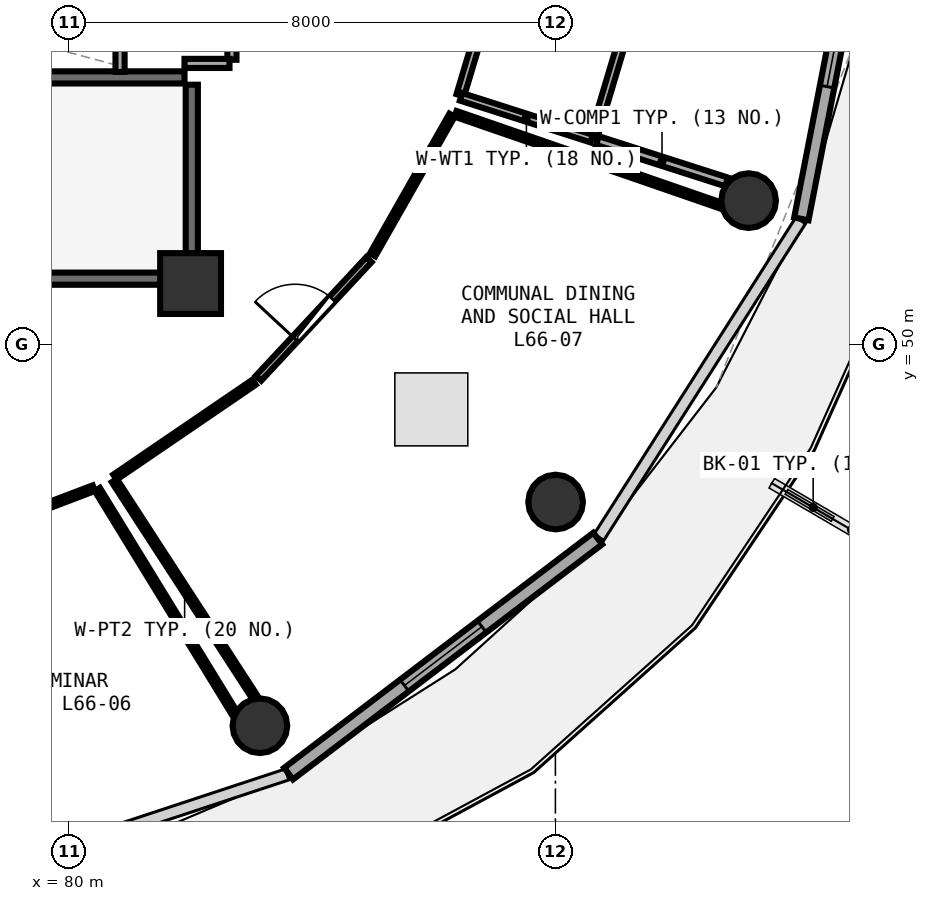
"""IFC4 building model, lengths in metres.
Left out: names, types, materials, properties, quantities, classifications, styles, units other than length and angle.
Written with IfcOpenShell. Run it as: python <this file> out.ifc"""

import sys

from ifc_helpers import new_model, si_unit, direction, frame, frame_2d, origin, origin_2d, place, context, subcontext, project, spatial, rectangle, circle, extrude, element, fill, save


model = new_model("IFC4")
c1 = context("Model", 3, precision=1e-05, world=origin(), true_north=direction((0.0, 1.0)))
c2 = subcontext(c1, "Body", "Model", "MODEL_VIEW")
j1 = project(units=[si_unit("LENGTHUNIT", "METRE"), si_unit("PLANEANGLEUNIT", "RADIAN")], contexts=[c1])
p1 = place(None, origin())
s1 = spatial("IfcSite", under=j1, at=p1, CompositionType="ELEMENT")
p2 = place(p1, origin())
s2 = spatial("IfcBuilding", under=s1, at=p2, CompositionType="ELEMENT")
p3 = place(p2, frame((0.0, 0.0, 259.95)))
s3 = spatial("IfcBuildingStorey", under=s2, at=p3, CompositionType="ELEMENT", Elevation=259.95)
p4 = place(p3, frame((82.0, 51.0, 0.0), z_axis=(0.0, 0.0, 1.0), x_axis=(1.0, 0.0, 0.0)))
e1 = element("IfcColumn", 1, at=p4, inside=s3, PredefinedType="PILASTER", context=c2, shape_type="SweptSolid", body=[
    extrude(rectangle(XDim=1.0, YDim=1.0, at=origin_2d()), origin(), (0.0, 0.0, 1.0), 3.75),
])
for number, where, z_axis, x_axis in (
    (2, (83.14, 43.728, 0.0), (0.0, 0.0, 1.0), (1.0, 0.0, 0.0)),
    (3, (88.003, 47.407, 0.0), (0.0, 0.0, 1.0), (1.0, 0.0, 0.0)),
    (4, (91.177, 52.364, 0.0), (0.0, 0.0, 1.0), (1.0, 0.0, 0.0)),
):
    element("IfcColumn", number, at=place(p3, frame(where, z_axis=z_axis, x_axis=x_axis)), inside=s3, PredefinedType="COLUMN", context=c2, shape_type="SweptSolid", body=[
        extrude(circle(Radius=0.45, at=origin_2d()), origin(), (0.0, 0.0, 1.0), 3.75),
    ])
p5 = place(p3, frame((83.612, 42.94, 0.0), z_axis=(0.0, 0.0, 1.0), x_axis=(0.796010444211, 0.605282886514, 0.0)))
e5 = element("IfcWall", 5, at=p5, inside=s3, PredefinedType="SOLIDWALL", context=c2, shape_type="SweptSolid", body=[
    extrude(rectangle(XDim=6.387, YDim=0.24, at=frame_2d((3.194, 0.0))), origin(), (0.0, 0.0, 1.0), 3.475),
])
p6 = place(p5, frame((2.394, 0.0, 0.85)))
e6 = element("IfcOpeningElement", 6, at=p6, cuts=e5, PredefinedType="OPENING", context=c2, shape_type="SweptSolid", body=[
    extrude(rectangle(XDim=1.6, YDim=1.45, at=frame_2d((0.8, 0.725))), frame((0.0, 0.13, 0.0), z_axis=(0.0, -1.0, 0.0), x_axis=(1.0, 0.0, 0.0)), (0.0, 0.0, 1.0), 0.26),
])
p7 = place(p3, frame((92.045, 52.063, 0.0), z_axis=(0.0, 0.0, 1.0), x_axis=(0.190969309115, 0.981596008028, 0.0)))
e7 = element("IfcWall", 7, at=p7, inside=s3, PredefinedType="SOLIDWALL", context=c2, shape_type="SweptSolid", body=[
    extrude(rectangle(XDim=6.033, YDim=0.24, at=frame_2d((3.017, 0.0))), origin(), (0.0, 0.0, 1.0), 3.475),
])
p8 = place(p7, frame((2.216, 0.0, 0.85)))
e8 = element("IfcOpeningElement", 8, at=p8, cuts=e7, PredefinedType="OPENING", context=c2, shape_type="SweptSolid", body=[
    extrude(rectangle(XDim=1.6, YDim=1.45, at=frame_2d((0.8, 0.725))), frame((0.0, 0.13, 0.0), z_axis=(0.0, -1.0, 0.0), x_axis=(1.0, 0.0, 0.0)), (0.0, 0.0, 1.0), 0.26),
])
p9 = place(p3, frame((74.0, 51.08, 0.0), z_axis=(0.0, 0.0, 1.0), x_axis=(1.0, 0.0, 0.0)))
e9 = element("IfcWall", 9, at=p9, inside=s3, PredefinedType="SHEAR", context=c2, shape_type="SweptSolid", body=[
    extrude(rectangle(XDim=7.9, YDim=0.2, at=frame_2d((3.95, 0.0))), origin(), (0.0, 0.0, 1.0), 3.49),
])
p10 = place(p9, frame((1.12, 0.0, 0.0)))
e10 = element("IfcOpeningElement", 10, at=p10, cuts=e9, PredefinedType="OPENING", context=c2, shape_type="SweptSolid", body=[
    extrude(rectangle(XDim=1.05, YDim=2.1, at=frame_2d((0.525, 1.05))), frame((0.0, 0.11, 0.0), z_axis=(0.0, -1.0, 0.0), x_axis=(1.0, 0.0, 0.0)), (0.0, 0.0, 1.0), 0.22),
])
p11 = place(p3, frame((82.02, 51.2, 0.0), z_axis=(0.0, 0.0, 1.0), x_axis=(0.0, 1.0, 0.0)))
e11 = element("IfcWall", 11, at=p11, inside=s3, PredefinedType="SHEAR", context=c2, shape_type="SweptSolid", body=[
    extrude(rectangle(XDim=3.07, YDim=0.2, at=frame_2d((1.535, 0.0))), origin(), (0.0, 0.0, 1.0), 3.49),
])
p12 = place(p3, frame((81.9, 54.39, 0.0), z_axis=(0.0, 0.0, 1.0), x_axis=(-1.0, 0.0, 0.0)))
e12 = element("IfcWall", 12, at=p12, inside=s3, PredefinedType="SHEAR", context=c2, shape_type="SweptSolid", body=[
    extrude(rectangle(XDim=8.46, YDim=0.2, at=frame_2d((4.23, 0.0))), origin(), (0.0, 0.0, 1.0), 3.49),
])
p13 = place(p3, frame((80.84, 54.48, 0.0), z_axis=(0.0, 0.0, 1.0), x_axis=(0.0, 1.0, 0.0)))
e13 = element("IfcWall", 13, at=p13, inside=s3, PredefinedType="PARTITIONING", context=c2, shape_type="SweptSolid", body=[
    extrude(rectangle(XDim=2.29, YDim=0.15, at=frame_2d((1.145, 0.0))), origin(), (0.0, 0.0, 1.0), 3.48),
])
p14 = place(p3, frame((82.68, 54.68, 0.0), z_axis=(0.0, 0.0, 1.0), x_axis=(0.0, 1.0, 0.0)))
e14 = element("IfcWall", 14, at=p14, inside=s3, PredefinedType="PARTITIONING", context=c2, shape_type="SweptSolid", body=[
    extrude(rectangle(XDim=2.21, YDim=0.15, at=frame_2d((1.105, 0.0))), origin(), (0.0, 0.0, 1.0), 3.48),
])
p15 = place(p14, frame((0.565, 0.0, 0.0)))
e15 = element("IfcOpeningElement", 15, at=p15, cuts=e14, PredefinedType="OPENING", context=c2, shape_type="SweptSolid", body=[
    extrude(rectangle(XDim=1.08, YDim=2.1, at=frame_2d((0.54, 1.05))), frame((0.0, 0.085, 0.0), z_axis=(0.0, -1.0, 0.0), x_axis=(1.0, 0.0, 0.0)), (0.0, 0.0, 1.0), 0.17),
])
p16 = place(p3, frame((83.118, 49.443, 0.0), z_axis=(0.0, 0.0, 1.0), x_axis=(0.681315269885, 0.731990097625, 0.0)))
e16 = element("IfcWall", 16, at=p16, inside=s3, PredefinedType="PARTITIONING", context=c2, shape_type="SweptSolid", body=[
    extrude(rectangle(XDim=2.664, YDim=0.12, at=frame_2d((1.332, 0.0))), origin(), (0.0, 0.0, 1.0), 3.075),
])
p17 = place(p16, frame((0.882, 0.0, 0.0)))
e17 = element("IfcOpeningElement", 17, at=p17, cuts=e16, PredefinedType="OPENING", context=c2, shape_type="SweptSolid", body=[
    extrude(rectangle(XDim=0.9, YDim=2.08, at=frame_2d((0.45, 1.04))), frame((0.0, 0.07, 0.0), z_axis=(0.0, -1.0, 0.0), x_axis=(1.0, 0.0, 0.0)), (0.0, 0.0, 1.0), 0.14),
])
p18 = place(p3, frame((81.9, 54.62, 0.0), z_axis=(0.0, 0.0, 1.0), x_axis=(1.0, 0.0, 0.0)))
e18 = element("IfcWall", 18, at=p18, inside=s3, PredefinedType="PARTITIONING", context=c2, shape_type="SweptSolid", body=[
    extrude(rectangle(XDim=0.74, YDim=0.15, at=frame_2d((0.37, 0.0))), origin(), (0.0, 0.0, 1.0), 2.775),
])
p19 = place(p3, frame((77.763, 46.629, 0.0), z_axis=(0.0, 0.0, 1.0), x_axis=(0.934691278896, 0.355460564839, 0.0)))
e19 = element("IfcWall", 19, at=p19, inside=s3, PredefinedType="PARTITIONING", context=c2, shape_type="SweptSolid", body=[
    extrude(rectangle(XDim=2.829, YDim=0.1, at=frame_2d((1.415, 0.0))), origin(), (0.0, 0.0, 1.0), 3.48),
])
p20 = place(p3, frame((80.466, 47.615, 0.0), z_axis=(0.0, 0.0, 1.0), x_axis=(0.522784059663, -0.852465147066, 0.0)))
e20 = element("IfcWall", 20, at=p20, inside=s3, PredefinedType="PARTITIONING", context=c2, shape_type="SweptSolid", body=[
    extrude(rectangle(XDim=4.306, YDim=0.1, at=frame_2d((2.153, 0.0))), origin(), (0.0, 0.0, 1.0), 3.175),
])
p21 = place(p3, frame((80.757, 47.816, 0.0), z_axis=(0.0, 0.0, 1.0), x_axis=(0.826087380575, 0.563542047814, 0.0)))
e21 = element("IfcWall", 21, at=p21, inside=s3, PredefinedType="PARTITIONING", context=c2, shape_type="SweptSolid", body=[
    extrude(rectangle(XDim=2.768, YDim=0.1, at=frame_2d((1.384, 0.0))), origin(), (0.0, 0.0, 1.0), 3.075),
])
p22 = place(p3, frame((84.994, 51.472, 0.0), z_axis=(0.0, 0.0, 1.0), x_axis=(0.494277588427, 0.869304127207, 0.0)))
e22 = element("IfcWall", 22, at=p22, inside=s3, PredefinedType="PARTITIONING", context=c2, shape_type="SweptSolid", body=[
    extrude(rectangle(XDim=2.643, YDim=0.1, at=frame_2d((1.322, 0.0))), origin(), (0.0, 0.0, 1.0), 3.075),
])
p23 = place(p3, frame((86.358, 53.791, 0.0), z_axis=(0.0, 0.0, 1.0), x_axis=(0.945103281494, -0.326771766388, 0.0)))
e23 = element("IfcWall", 23, at=p23, inside=s3, PredefinedType="PARTITIONING", context=c2, shape_type="SweptSolid", body=[
    extrude(rectangle(XDim=4.604, YDim=0.1, at=frame_2d((2.302, 0.0))), origin(), (0.0, 0.0, 1.0), 3.075),
])
p24 = place(p3, frame((83.058, 44.196, 0.0), z_axis=(0.0, 0.0, 1.0), x_axis=(-0.544234825024, 0.838932926539, 0.0)))
e24 = element("IfcWall", 24, at=p24, inside=s3, PredefinedType="PARTITIONING", context=c2, shape_type="SweptSolid", body=[
    extrude(rectangle(XDim=4.249, YDim=0.1, at=frame_2d((2.125, 0.0))), origin(), (0.0, 0.0, 1.0), 3.075),
])
p25 = place(p3, frame((86.436, 54.096, 0.0), z_axis=(0.0, 0.0, 1.0), x_axis=(0.287308367232, 0.957838139833, 0.0)))
e25 = element("IfcWall", 25, at=p25, inside=s3, PredefinedType="PLUMBINGWALL", context=c2, shape_type="SweptSolid", body=[
    extrude(rectangle(XDim=1.7, YDim=0.13, at=frame_2d((0.85, 0.0))), origin(), (0.0, 0.0, 1.0), 3.48),
])
p26 = place(p3, frame((89.198, 55.322, 0.0), z_axis=(0.0, 0.0, 1.0), x_axis=(-0.286890981069, -0.957963237803, 0.0)))
e26 = element("IfcWall", 26, at=p26, inside=s3, PredefinedType="PLUMBINGWALL", context=c2, shape_type="SweptSolid", body=[
    extrude(rectangle(XDim=2.01, YDim=0.13, at=frame_2d((1.005, 0.0))), origin(), (0.0, 0.0, 1.0), 3.48),
])
p27 = place(p3, frame((88.597, 53.383, 0.0), z_axis=(0.0, 0.0, 1.0), x_axis=(-0.952372601519, 0.304936760454, 0.0)))
e27 = element("IfcWall", 27, at=p27, inside=s3, PredefinedType="PLUMBINGWALL", context=c2, shape_type="SweptSolid", body=[
    extrude(rectangle(XDim=2.255, YDim=0.13, at=frame_2d((1.128, 0.0))), origin(), (0.0, 0.0, 1.0), 3.175),
])
p28 = place(p3, frame((90.816, 52.671, 0.0), z_axis=(0.0, 0.0, 1.0), x_axis=(-0.952285550261, 0.305208503755, 0.0)))
e28 = element("IfcWall", 28, at=p28, inside=s3, PredefinedType="PARTITIONING", context=c2, shape_type="SweptSolid", body=[
    extrude(rectangle(XDim=2.231, YDim=0.15, at=frame_2d((1.115, 0.0))), origin(), (0.0, 0.0, 1.0), 3.235),
])
p29 = place(p6, origin())
e29 = element("IfcWindow", 29, at=p29, inside=s3, PartitioningType="SINGLE_PANEL", PredefinedType="WINDOW", context=c2, shape_type="SweptSolid", body=[
    extrude(rectangle(XDim=1.6, YDim=1.45, at=frame_2d((0.8, 0.725))), frame((0.0, 0.03, 0.0), z_axis=(0.0, -1.0, 0.0), x_axis=(1.0, 0.0, 0.0)), (0.0, 0.0, 1.0), 0.06),
])
fill(e6, e29)
p30 = place(p8, origin())
e30 = element("IfcWindow", 30, at=p30, inside=s3, PartitioningType="SINGLE_PANEL", PredefinedType="WINDOW", context=c2, shape_type="SweptSolid", body=[
    extrude(rectangle(XDim=1.6, YDim=1.45, at=frame_2d((0.8, 0.725))), frame((0.0, 0.03, 0.0), z_axis=(0.0, -1.0, 0.0), x_axis=(1.0, 0.0, 0.0)), (0.0, 0.0, 1.0), 0.06),
])
fill(e8, e30)
p31 = place(p17, origin())
e31 = element("IfcDoor", 31, at=p31, inside=s3, OperationType="SINGLE_SWING_LEFT", PredefinedType="DOOR", context=c2, shape_type="SweptSolid", body=[
    extrude(rectangle(XDim=0.9, YDim=2.08, at=frame_2d((0.45, 1.04))), frame((0.0, 0.025, 0.0), z_axis=(0.0, -1.0, 0.0), x_axis=(1.0, 0.0, 0.0)), (0.0, 0.0, 1.0), 0.05),
])
fill(e17, e31)
save(model, sys.argv[1])
